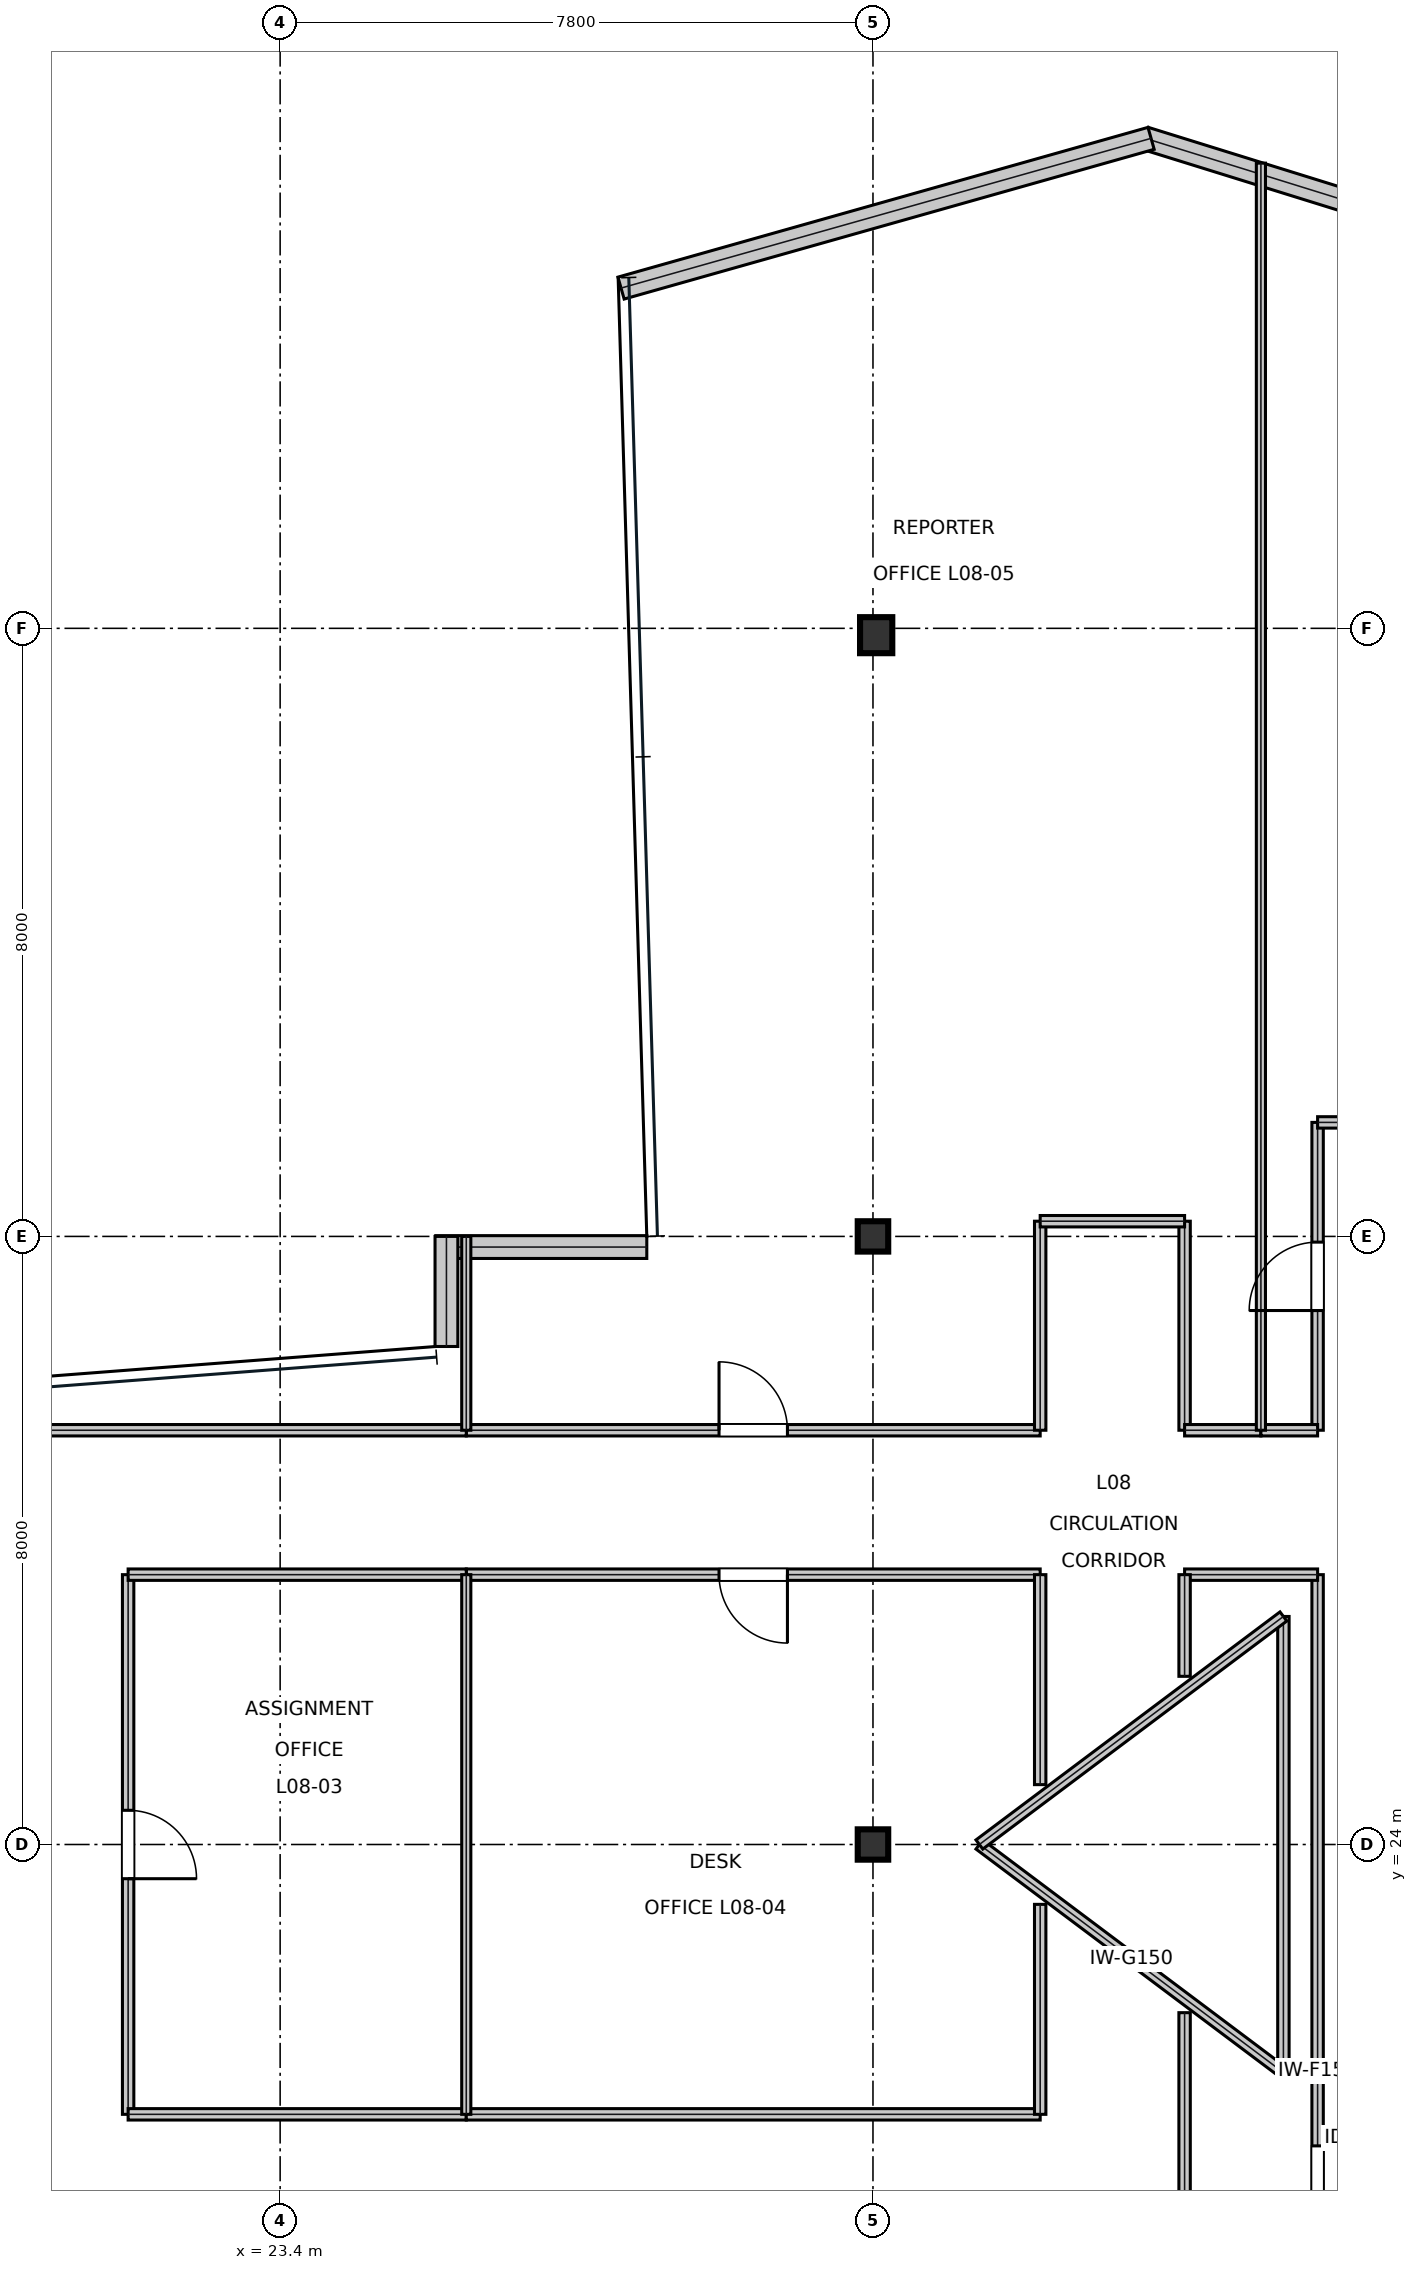
"""IFC4 building model, lengths in metres.
Left out: names, types, materials, properties, quantities, classifications, styles, units other than length and angle.
Written with IfcOpenShell. Run it as: python <this file> out.ifc"""

import sys

from ifc_helpers import new_model, si_unit, direction, frame, frame_2d, origin, origin_2d, place, context, subcontext, project, spatial, rectangle, i_section, extrude, element, fill, save


model = new_model("IFC4")
c1 = context("Model", 3, precision=1e-05, world=origin(), true_north=direction((0.0, 1.0)))
c2 = subcontext(c1, "Body", "Model", "MODEL_VIEW")
j1 = project(units=[si_unit("LENGTHUNIT", "METRE"), si_unit("PLANEANGLEUNIT", "RADIAN")], contexts=[c1])
p1 = place(None, origin())
s1 = spatial("IfcSite", under=j1, at=p1, CompositionType="ELEMENT")
p2 = place(p1, origin())
s2 = spatial("IfcBuilding", under=s1, at=p2, CompositionType="ELEMENT")
p3 = place(p2, frame((0.0, 0.0, 41.85)))
s3 = spatial("IfcBuildingStorey", under=s2, at=p3, CompositionType="ELEMENT", Elevation=41.85)
for number, where, z_axis, x_axis in (
    (1, (31.2, 24.0, 0.0), (0.0, 0.0, 1.0), (1.0, 0.0, 0.0)),
    (2, (31.2, 32.0, 0.0), (0.0, 0.0, 1.0), (1.0, 0.0, 0.0)),
):
    element("IfcColumn", number, at=place(p3, frame(where, z_axis=z_axis, x_axis=x_axis)), inside=s3, PredefinedType="COLUMN", context=c2, shape_type="SweptSolid", body=[
        extrude(i_section(OverallWidth=0.401, OverallDepth=0.399, WebThickness=0.025, FlangeThickness=0.04, at=origin_2d()), origin(), (0.0, 0.0, 1.0), 4.044),
    ])
p4 = place(p3, frame((31.242, 39.91, 0.016), z_axis=(0.0, 0.0, 1.0), x_axis=(1.0, 0.0, 0.0)))
e3 = element("IfcColumn", 3, at=p4, inside=s3, PredefinedType="COLUMN", context=c2, shape_type="SweptSolid", body=[
    extrude(i_section(OverallWidth=0.424, OverallDepth=0.474, WebThickness=0.048, FlangeThickness=0.077, at=origin_2d()), origin(), (0.0, 0.0, 1.0), 4.018),
])
p5 = place(p3, frame((41.753, 44.28, 0.0), z_axis=(0.0, 0.0, 1.0), x_axis=(-0.954957033511, 0.296744105498, 0.0)))
e4 = element("IfcWall", 4, at=p5, inside=s3, PredefinedType="STANDARD", context=c2, shape_type="SweptSolid", body=[
    extrude(rectangle(XDim=7.302, YDim=0.3, at=frame_2d((3.651, 0.0))), origin(), (0.0, 0.0, 1.0), 3.81),
])
p6 = place(p3, frame((34.859, 46.446, 0.0), z_axis=(0.0, 0.0, 1.0), x_axis=(-0.962339681863, -0.271849842212, 0.0)))
e5 = element("IfcWall", 5, at=p6, inside=s3, PredefinedType="STANDARD", context=c2, shape_type="SweptSolid", body=[
    extrude(rectangle(XDim=7.247, YDim=0.3, at=frame_2d((3.623, 0.0))), origin(), (0.0, 0.0, 1.0), 3.81),
])
p7 = place(p3, frame((28.224, 31.86, 0.0), z_axis=(0.0, 0.0, 1.0), x_axis=(-1.0, 0.0, 0.0)))
e6 = element("IfcWall", 6, at=p7, inside=s3, PredefinedType="STANDARD", context=c2, shape_type="SweptSolid", body=[
    extrude(rectangle(XDim=2.776, YDim=0.3, at=frame_2d((1.388, 0.0))), origin(), (0.0, 0.0, 1.0), 3.81),
])
p8 = place(p3, frame((25.588, 32.0, 0.0), z_axis=(0.0, 0.0, 1.0), x_axis=(0.0, -1.0, 0.0)))
e7 = element("IfcWall", 7, at=p8, inside=s3, PredefinedType="STANDARD", context=c2, shape_type="SweptSolid", body=[
    extrude(rectangle(XDim=1.448, YDim=0.3, at=frame_2d((0.724, 0.0))), origin(), (0.0, 0.0, 1.0), 3.338),
])
p9 = place(p3, frame((37.05, 14.5, 0.0), z_axis=(0.0, 0.0, 1.0), x_axis=(0.0, 1.0, 0.0)))
e8 = element("IfcWall", 8, at=p9, inside=s3, PredefinedType="PARTITIONING", context=c2, shape_type="SweptSolid", body=[
    extrude(rectangle(XDim=13.05, YDim=0.15, at=frame_2d((6.525, 0.0))), origin(), (0.0, 0.0, 1.0), 3.181),
])
p10 = place(p9, frame((4.635, 0.0, 0.0)))
e9 = element("IfcOpeningElement", 9, at=p10, cuts=e8, PredefinedType="OPENING", context=c2, shape_type="SweptSolid", body=[
    extrude(rectangle(XDim=0.9, YDim=2.15, at=frame_2d((0.45, 1.075))), frame((0.0, 0.085, 0.0), z_axis=(0.0, -1.0, 0.0), x_axis=(1.0, 0.0, 0.0)), (0.0, 0.0, 1.0), 0.17),
])
p11 = place(p3, frame((21.4, 20.45, 0.0), z_axis=(0.0, 0.0, 1.0), x_axis=(0.0, 1.0, 0.0)))
e10 = element("IfcWall", 10, at=p11, inside=s3, PredefinedType="PARTITIONING", context=c2, shape_type="SweptSolid", body=[
    extrude(rectangle(XDim=7.1, YDim=0.15, at=frame_2d((3.55, 0.0))), origin(), (0.0, 0.0, 1.0), 3.181),
])
p12 = place(p11, frame((3.1, 0.0, 0.0)))
e11 = element("IfcOpeningElement", 11, at=p12, cuts=e10, PredefinedType="OPENING", context=c2, shape_type="SweptSolid", body=[
    extrude(rectangle(XDim=0.9, YDim=2.15, at=frame_2d((0.45, 1.075))), frame((0.0, 0.085, 0.0), z_axis=(0.0, -1.0, 0.0), x_axis=(1.0, 0.0, 0.0)), (0.0, 0.0, 1.0), 0.17),
])
p13 = place(p3, frame((25.849, 27.55, 0.0), z_axis=(0.0, 0.0, 1.0), x_axis=(1.0, 0.0, 0.0)))
e12 = element("IfcWall", 12, at=p13, inside=s3, PredefinedType="PARTITIONING", context=c2, shape_type="SweptSolid", body=[
    extrude(rectangle(XDim=7.551, YDim=0.15, at=frame_2d((3.775, 0.0))), origin(), (0.0, 0.0, 1.0), 3.181),
])
p14 = place(p13, frame((3.325, 0.0, 0.0)))
e13 = element("IfcOpeningElement", 13, at=p14, cuts=e12, PredefinedType="OPENING", context=c2, shape_type="SweptSolid", body=[
    extrude(rectangle(XDim=0.9, YDim=2.15, at=frame_2d((0.45, 1.075))), frame((0.0, 0.085, 0.0), z_axis=(0.0, -1.0, 0.0), x_axis=(1.0, 0.0, 0.0)), (0.0, 0.0, 1.0), 0.17),
])
p15 = place(p3, frame((25.849, 29.45, 0.0), z_axis=(0.0, 0.0, 1.0), x_axis=(1.0, 0.0, 0.0)))
e14 = element("IfcWall", 14, at=p15, inside=s3, PredefinedType="PARTITIONING", context=c2, shape_type="SweptSolid", body=[
    extrude(rectangle(XDim=7.551, YDim=0.15, at=frame_2d((3.775, 0.0))), origin(), (0.0, 0.0, 1.0), 3.181),
])
p16 = place(p15, frame((3.325, 0.0, 0.0)))
e15 = element("IfcOpeningElement", 15, at=p16, cuts=e14, PredefinedType="OPENING", context=c2, shape_type="SweptSolid", body=[
    extrude(rectangle(XDim=0.9, YDim=2.15, at=frame_2d((0.45, 1.075))), frame((0.0, 0.085, 0.0), z_axis=(0.0, -1.0, 0.0), x_axis=(1.0, 0.0, 0.0)), (0.0, 0.0, 1.0), 0.17),
])
p17 = place(p3, frame((37.05, 29.45, 0.0), z_axis=(0.0, 0.0, 1.0), x_axis=(0.0, 1.0, 0.0)))
e16 = element("IfcWall", 16, at=p17, inside=s3, PredefinedType="PARTITIONING", context=c2, shape_type="SweptSolid", body=[
    extrude(rectangle(XDim=4.05, YDim=0.15, at=frame_2d((2.025, 0.0))), origin(), (0.0, 0.0, 1.0), 3.181),
])
p18 = place(p17, frame((1.575, 0.0, 0.0)))
e17 = element("IfcOpeningElement", 17, at=p18, cuts=e16, PredefinedType="OPENING", context=c2, shape_type="SweptSolid", body=[
    extrude(rectangle(XDim=0.9, YDim=2.15, at=frame_2d((0.45, 1.075))), frame((0.0, 0.085, 0.0), z_axis=(0.0, -1.0, 0.0), x_axis=(1.0, 0.0, 0.0)), (0.0, 0.0, 1.0), 0.17),
])
p19 = place(p3, frame((35.3, 15.8, 0.0), z_axis=(0.0, 0.0, 1.0), x_axis=(0.0, 1.0, 0.0)))
e18 = element("IfcWall", 18, at=p19, inside=s3, PredefinedType="PARTITIONING", context=c2, shape_type="SweptSolid", body=[
    extrude(rectangle(XDim=5.988, YDim=0.15, at=frame_2d((2.994, 0.0))), origin(), (0.0, 0.0, 1.0), 3.181),
])
p20 = place(p3, frame((35.3, 27.55, 0.0), z_axis=(0.0, 0.0, 1.0), x_axis=(1.0, 0.0, 0.0)))
e19 = element("IfcWall", 19, at=p20, inside=s3, PredefinedType="PARTITIONING", context=c2, shape_type="SweptSolid", body=[
    extrude(rectangle(XDim=1.75, YDim=0.15, at=frame_2d((0.875, 0.0))), origin(), (0.0, 0.0, 1.0), 3.391),
])
p21 = place(p3, frame((35.3, 26.212, 0.0), z_axis=(0.0, 0.0, 1.0), x_axis=(0.0, 1.0, 0.0)))
e20 = element("IfcWall", 20, at=p21, inside=s3, PredefinedType="PARTITIONING", context=c2, shape_type="SweptSolid", body=[
    extrude(rectangle(XDim=1.338, YDim=0.15, at=frame_2d((0.669, 0.0))), origin(), (0.0, 0.0, 1.0), 3.81),
])
p22 = place(p3, frame((14.0, 29.45, 0.0), z_axis=(0.0, 0.0, 1.0), x_axis=(1.0, 0.0, 0.0)))
e21 = element("IfcWall", 21, at=p22, inside=s3, PredefinedType="PARTITIONING", context=c2, shape_type="SweptSolid", body=[
    extrude(rectangle(XDim=11.849, YDim=0.15, at=frame_2d((5.925, 0.0))), origin(), (0.0, 0.0, 1.0), 3.338),
])
for number, where, z_axis, x_axis in (
    (22, (21.4, 27.55, 0.0), (0.0, 0.0, 1.0), (1.0, 0.0, 0.0)),
    (23, (21.4, 20.45, 0.0), (0.0, 0.0, 1.0), (1.0, 0.0, 0.0)),
):
    element("IfcWall", number, at=place(p3, frame(where, z_axis=z_axis, x_axis=x_axis)), inside=s3, PredefinedType="PARTITIONING", context=c2, shape_type="SweptSolid", body=[
        extrude(rectangle(XDim=4.449, YDim=0.15, at=frame_2d((2.225, 0.0))), origin(), (0.0, 0.0, 1.0), 3.391),
    ])
p23 = place(p3, frame((25.849, 20.45, 0.0), z_axis=(0.0, 0.0, 1.0), x_axis=(1.0, 0.0, 0.0)))
e24 = element("IfcWall", 24, at=p23, inside=s3, PredefinedType="PARTITIONING", context=c2, shape_type="SweptSolid", body=[
    extrude(rectangle(XDim=7.551, YDim=0.15, at=frame_2d((3.775, 0.0))), origin(), (0.0, 0.0, 1.0), 3.181),
])
for number, where, z_axis, x_axis in (
    (25, (33.4, 24.788, 0.0), (0.0, 0.0, 1.0), (0.0, 1.0, 0.0)),
    (26, (33.4, 20.45, 0.0), (0.0, 0.0, 1.0), (0.0, 1.0, 0.0)),
):
    element("IfcWall", number, at=place(p3, frame(where, z_axis=z_axis, x_axis=x_axis)), inside=s3, PredefinedType="PARTITIONING", context=c2, shape_type="SweptSolid", body=[
        extrude(rectangle(XDim=2.762, YDim=0.15, at=frame_2d((1.381, 0.0))), origin(), (0.0, 0.0, 1.0), 3.81),
    ])
for number, where, z_axis, x_axis in (
    (27, (33.4, 29.45, 0.0), (0.0, 0.0, 1.0), (0.0, 1.0, 0.0)),
    (28, (35.3, 29.45, 0.0), (0.0, 0.0, 1.0), (0.0, 1.0, 0.0)),
):
    element("IfcWall", number, at=place(p3, frame(where, z_axis=z_axis, x_axis=x_axis)), inside=s3, PredefinedType="PARTITIONING", context=c2, shape_type="SweptSolid", body=[
        extrude(rectangle(XDim=2.75, YDim=0.15, at=frame_2d((1.375, 0.0))), origin(), (0.0, 0.0, 1.0), 3.181),
    ])
p24 = place(p3, frame((33.4, 32.2, 0.0), z_axis=(0.0, 0.0, 1.0), x_axis=(1.0, 0.0, 0.0)))
e29 = element("IfcWall", 29, at=p24, inside=s3, PredefinedType="PARTITIONING", context=c2, shape_type="SweptSolid", body=[
    extrude(rectangle(XDim=1.9, YDim=0.15, at=frame_2d((0.95, 0.0))), origin(), (0.0, 0.0, 1.0), 3.181),
])
p25 = place(p3, frame((35.3, 29.45, 0.0), z_axis=(0.0, 0.0, 1.0), x_axis=(1.0, 0.0, 0.0)))
e30 = element("IfcWall", 30, at=p25, inside=s3, PredefinedType="PARTITIONING", context=c2, shape_type="SweptSolid", body=[
    extrude(rectangle(XDim=1.004, YDim=0.15, at=frame_2d((0.502, 0.0))), origin(), (0.0, 0.0, 1.0), 3.81),
])
p26 = place(p3, frame((37.05, 33.5, 0.0), z_axis=(0.0, 0.0, 1.0), x_axis=(1.0, 0.0, 0.0)))
e31 = element("IfcWall", 31, at=p26, inside=s3, PredefinedType="PARTITIONING", context=c2, shape_type="SweptSolid", body=[
    extrude(rectangle(XDim=1.9, YDim=0.15, at=frame_2d((0.95, 0.0))), origin(), (0.0, 0.0, 1.0), 3.81),
])
p27 = place(p3, frame((36.304, 29.45, 0.0), z_axis=(0.0, 0.0, 1.0), x_axis=(1.0, 0.0, 0.0)))
e32 = element("IfcWall", 32, at=p27, inside=s3, PredefinedType="PARTITIONING", context=c2, shape_type="SweptSolid", body=[
    extrude(rectangle(XDim=0.746, YDim=0.15, at=frame_2d((0.373, 0.0))), origin(), (0.0, 0.0, 1.0), 3.81),
])
p28 = place(p3, frame((25.849, 29.45, 0.0), z_axis=(0.0, 0.0, 1.0), x_axis=(0.0, 1.0, 0.0)))
e33 = element("IfcWall", 33, at=p28, inside=s3, PredefinedType="PARTITIONING", context=c2, shape_type="SweptSolid", body=[
    extrude(rectangle(XDim=2.55, YDim=0.12, at=frame_2d((1.275, 0.0))), origin(), (0.0, 0.0, 1.0), 3.338),
])
p29 = place(p3, frame((25.849, 20.45, 0.0), z_axis=(0.0, 0.0, 1.0), x_axis=(0.0, 1.0, 0.0)))
e34 = element("IfcWall", 34, at=p29, inside=s3, PredefinedType="PARTITIONING", context=c2, shape_type="SweptSolid", body=[
    extrude(rectangle(XDim=7.1, YDim=0.12, at=frame_2d((3.55, 0.0))), origin(), (0.0, 0.0, 1.0), 3.181),
])
p30 = place(p3, frame((36.304, 29.45, 0.0), z_axis=(0.0, 0.0, 1.0), x_axis=(0.0, 1.0, 0.0)))
e35 = element("IfcWall", 35, at=p30, inside=s3, PredefinedType="PARTITIONING", context=c2, shape_type="SweptSolid", body=[
    extrude(rectangle(XDim=16.67, YDim=0.12, at=frame_2d((8.335, 0.0))), origin(), (0.0, 0.0, 1.0), 3.181),
])
p31 = place(p3, frame((32.6, 24.0, 0.0), z_axis=(0.0, 0.0, 1.0), x_axis=(0.8, -0.6, 0.0)))
e36 = element("IfcWall", 36, at=p31, inside=s3, PredefinedType="MOVABLE", context=c2, shape_type="SweptSolid", body=[
    extrude(rectangle(XDim=5.0, YDim=0.15, at=frame_2d((2.5, 0.0))), origin(), (0.0, 0.0, 1.0), 3.81),
])
p32 = place(p3, frame((36.6, 21.0, 0.0), z_axis=(0.0, 0.0, 1.0), x_axis=(0.0, 1.0, 0.0)))
e37 = element("IfcWall", 37, at=p32, inside=s3, PredefinedType="MOVABLE", context=c2, shape_type="SweptSolid", body=[
    extrude(rectangle(XDim=6.0, YDim=0.15, at=frame_2d((3.0, 0.0))), origin(), (0.0, 0.0, 1.0), 3.81),
])
p33 = place(p3, frame((36.6, 27.0, 0.0), z_axis=(0.0, 0.0, 1.0), x_axis=(-0.8, -0.6, 0.0)))
e38 = element("IfcWall", 38, at=p33, inside=s3, PredefinedType="MOVABLE", context=c2, shape_type="SweptSolid", body=[
    extrude(rectangle(XDim=5.0, YDim=0.15, at=frame_2d((2.5, 0.0))), origin(), (0.0, 0.0, 1.0), 3.81),
])
p34 = place(p10, frame((0.9, 0.0, 0.0), z_axis=(0.0, 0.0, 1.0), x_axis=(-1.0, 0.0, 0.0)))
e39 = element("IfcDoor", 39, at=p34, inside=s3, OperationType="SINGLE_SWING_RIGHT", PredefinedType="DOOR", context=c2, shape_type="SweptSolid", body=[
    extrude(rectangle(XDim=0.9, YDim=2.15, at=frame_2d((0.45, 1.075))), frame((0.0, 0.025, 0.0), z_axis=(0.0, -1.0, 0.0), x_axis=(1.0, 0.0, 0.0)), (0.0, 0.0, 1.0), 0.05),
])
fill(e9, e39)
p35 = place(p12, frame((0.9, 0.0, 0.0), z_axis=(0.0, 0.0, 1.0), x_axis=(-1.0, 0.0, 0.0)))
e40 = element("IfcDoor", 40, at=p35, inside=s3, OperationType="SINGLE_SWING_RIGHT", PredefinedType="DOOR", context=c2, shape_type="SweptSolid", body=[
    extrude(rectangle(XDim=0.9, YDim=2.15, at=frame_2d((0.45, 1.075))), frame((0.0, 0.025, 0.0), z_axis=(0.0, -1.0, 0.0), x_axis=(1.0, 0.0, 0.0)), (0.0, 0.0, 1.0), 0.05),
])
fill(e11, e40)
p36 = place(p14, frame((0.9, 0.0, 0.0), z_axis=(0.0, 0.0, 1.0), x_axis=(-1.0, 0.0, 0.0)))
e41 = element("IfcDoor", 41, at=p36, inside=s3, OperationType="SINGLE_SWING_LEFT", PredefinedType="DOOR", context=c2, shape_type="SweptSolid", body=[
    extrude(rectangle(XDim=0.9, YDim=2.15, at=frame_2d((0.45, 1.075))), frame((0.0, 0.025, 0.0), z_axis=(0.0, -1.0, 0.0), x_axis=(1.0, 0.0, 0.0)), (0.0, 0.0, 1.0), 0.05),
])
fill(e13, e41)
p37 = place(p16, origin())
e42 = element("IfcDoor", 42, at=p37, inside=s3, OperationType="SINGLE_SWING_LEFT", PredefinedType="DOOR", context=c2, shape_type="SweptSolid", body=[
    extrude(rectangle(XDim=0.9, YDim=2.15, at=frame_2d((0.45, 1.075))), frame((0.0, 0.025, 0.0), z_axis=(0.0, -1.0, 0.0), x_axis=(1.0, 0.0, 0.0)), (0.0, 0.0, 1.0), 0.05),
])
fill(e15, e42)
p38 = place(p18, origin())
e43 = element("IfcDoor", 43, at=p38, inside=s3, OperationType="SINGLE_SWING_LEFT", PredefinedType="DOOR", context=c2, shape_type="SweptSolid", body=[
    extrude(rectangle(XDim=0.9, YDim=2.15, at=frame_2d((0.45, 1.075))), frame((0.0, 0.025, 0.0), z_axis=(0.0, -1.0, 0.0), x_axis=(1.0, 0.0, 0.0)), (0.0, 0.0, 1.0), 0.05),
])
fill(e17, e43)
save(model, sys.argv[1])
